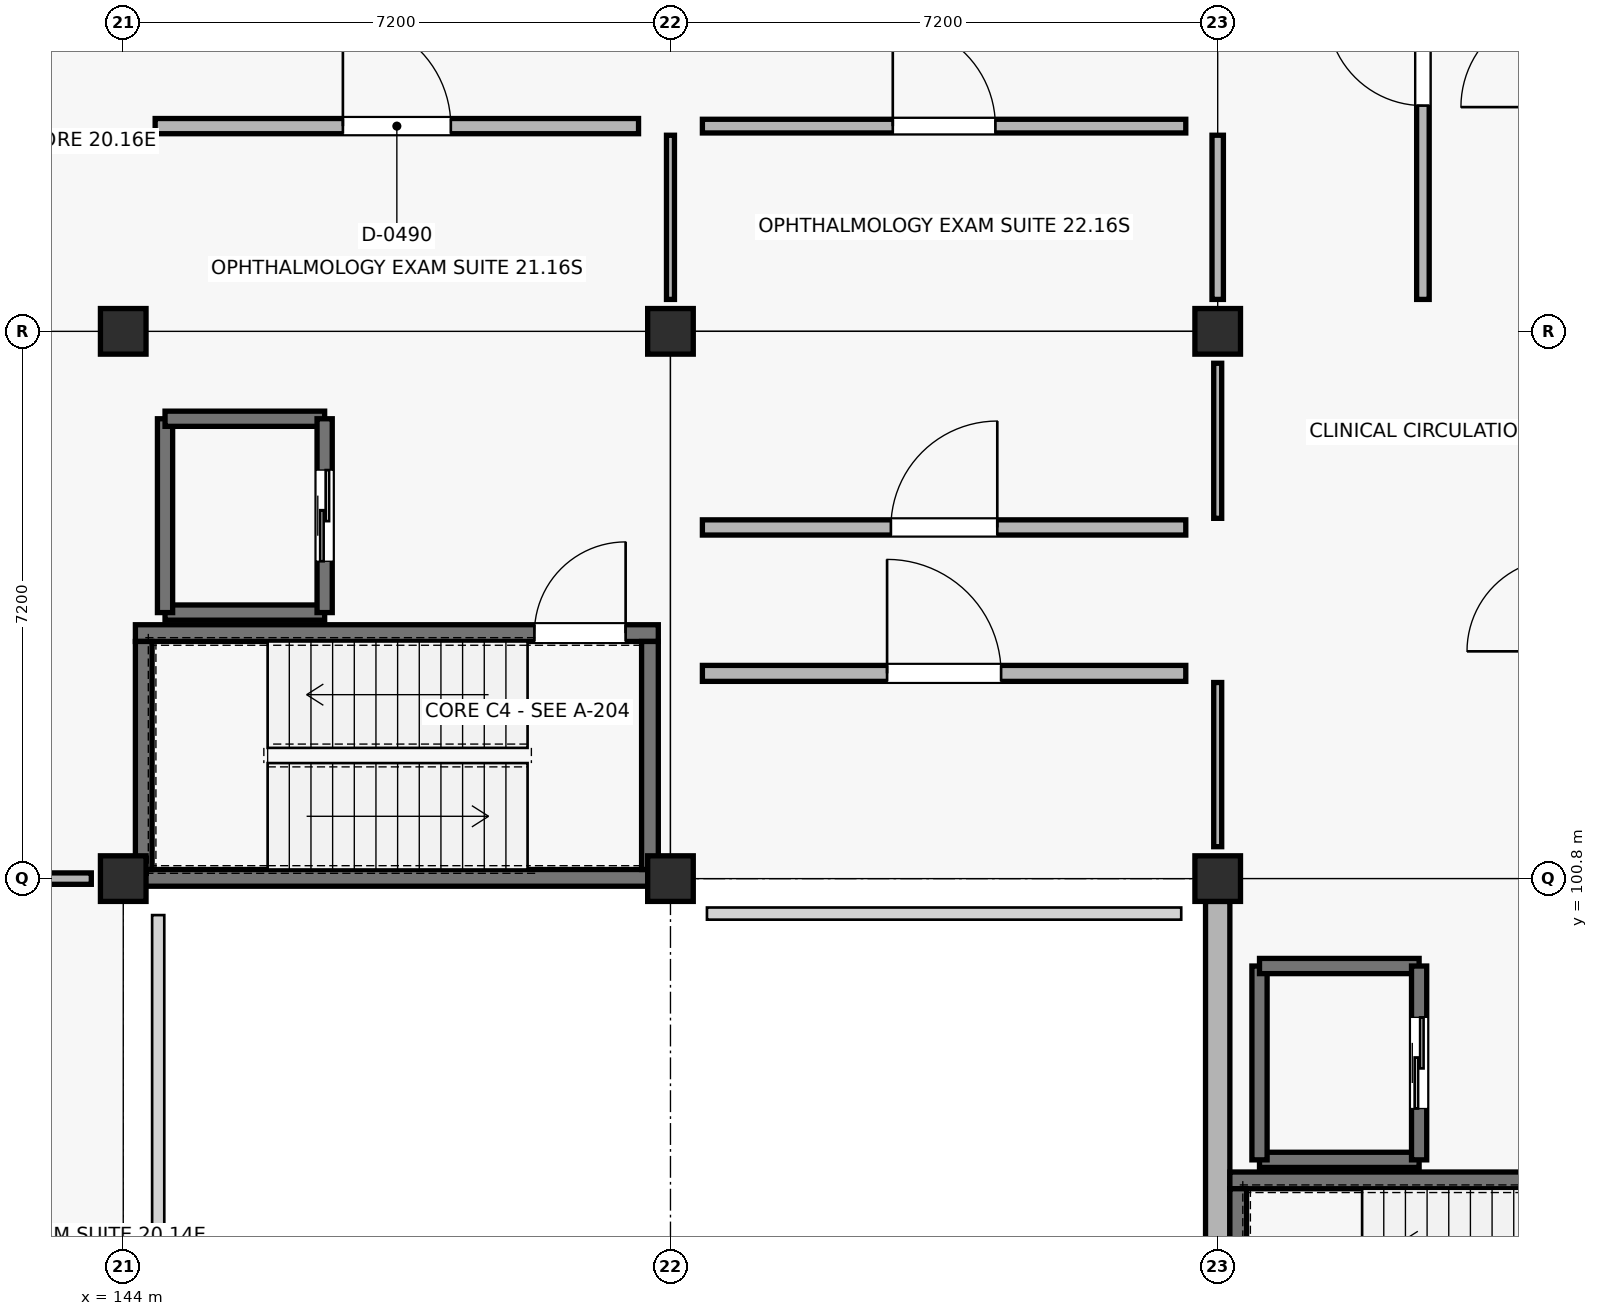
"""IFC4 building model, lengths in metres.
Left out: names, types, materials, properties, quantities, classifications, styles, units other than length and angle.
Written with IfcOpenShell. Run it as: python <this file> out.ifc"""

import sys

from ifc_helpers import new_model, si_unit, direction, frame, frame_2d, origin, origin_2d, place, context, subcontext, project, spatial, rectangle, extrude, element, fill, save


model = new_model("IFC4")
c1 = context("Model", 3, precision=1e-05, world=origin(), true_north=direction((0.0, 1.0)))
c2 = subcontext(c1, "Body", "Model", "MODEL_VIEW")
j1 = project(units=[si_unit("LENGTHUNIT", "METRE"), si_unit("PLANEANGLEUNIT", "RADIAN")], contexts=[c1])
p1 = place(None, origin())
s1 = spatial("IfcSite", under=j1, at=p1, CompositionType="ELEMENT")
p2 = place(p1, origin())
s2 = spatial("IfcBuilding", under=s1, at=p2, CompositionType="ELEMENT")
p3 = place(p2, frame((0.0, 0.0, 9.0)))
s3 = spatial("IfcBuildingStorey", under=s2, at=p3, CompositionType="ELEMENT", Elevation=9.0)
for number, where, z_axis, x_axis in (
    (1, (144.0, 100.8, 0.0), (0.0, 0.0, 1.0), (1.0, 0.0, 0.0)),
    (2, (144.0, 108.0, 0.0), (0.0, 0.0, 1.0), (1.0, 0.0, 0.0)),
    (3, (151.2, 100.8, 0.0), (0.0, 0.0, 1.0), (1.0, 0.0, 0.0)),
    (4, (151.2, 108.0, 0.0), (0.0, 0.0, 1.0), (1.0, 0.0, 0.0)),
    (5, (158.4, 100.8, 0.0), (0.0, 0.0, 1.0), (1.0, 0.0, 0.0)),
    (6, (158.4, 108.0, 0.0), (0.0, 0.0, 1.0), (1.0, 0.0, 0.0)),
):
    element("IfcColumn", number, at=place(p3, frame(where, z_axis=z_axis, x_axis=x_axis)), inside=s3, PredefinedType="COLUMN", context=c2, shape_type="SweptSolid", body=[
        extrude(rectangle(XDim=0.6, YDim=0.6, at=origin_2d()), origin(), (0.0, 0.0, 1.0), 4.5),
    ])
p4 = place(p3, frame((158.4, 100.5, 0.0), z_axis=(0.0, 0.0, 1.0), x_axis=(0.0, -1.0, 0.0)))
e7 = element("IfcWall", 7, at=p4, inside=s3, PredefinedType="STANDARD", context=c2, shape_type="SweptSolid", body=[
    extrude(rectangle(XDim=6.6, YDim=0.32, at=frame_2d((3.3, 0.0))), origin(), (0.0, 0.0, 1.0), 3.69),
])
p5 = place(p3, frame((158.56, 96.83, 0.0), z_axis=(0.0, 0.0, 1.0), x_axis=(1.0, 0.0, 0.0)))
e8 = element("IfcWall", 8, at=p5, inside=s3, PredefinedType="SHEAR", context=c2, shape_type="SweptSolid", body=[
    extrude(rectangle(XDim=6.88, YDim=0.22, at=frame_2d((3.44, 0.0))), origin(), (0.0, 0.0, 1.0), 4.24),
])
p6 = place(p5, frame((5.25, 0.0, 0.0)))
e9 = element("IfcOpeningElement", 9, at=p6, cuts=e8, PredefinedType="OPENING", context=c2, shape_type="SweptSolid", body=[
    extrude(rectangle(XDim=1.2, YDim=2.15, at=frame_2d((0.6, 1.075))), frame((0.0, 0.12, 0.0), z_axis=(0.0, -1.0, 0.0), x_axis=(1.0, 0.0, 0.0)), (0.0, 0.0, 1.0), 0.24),
])
p7 = place(p3, frame((158.67, 93.72, 0.0), z_axis=(0.0, 0.0, 1.0), x_axis=(0.0, 1.0, 0.0)))
e10 = element("IfcWall", 10, at=p7, inside=s3, PredefinedType="SHEAR", context=c2, shape_type="SweptSolid", body=[
    extrude(rectangle(XDim=3.0, YDim=0.22, at=frame_2d((1.5, 0.0))), origin(), (0.0, 0.0, 1.0), 4.24),
])
p8 = place(p3, frame((158.95, 97.1, 0.0), z_axis=(0.0, 0.0, 1.0), x_axis=(1.0, 0.0, 0.0)))
e11 = element("IfcWall", 11, at=p8, inside=s3, PredefinedType="SHEAR", context=c2, shape_type="SweptSolid", body=[
    extrude(rectangle(XDim=2.1, YDim=0.2, at=frame_2d((1.05, 0.0))), origin(), (0.0, 0.0, 1.0), 4.24),
])
p9 = place(p3, frame((158.95, 97.1, 0.0), z_axis=(0.0, 0.0, 1.0), x_axis=(0.0, 1.0, 0.0)))
e12 = element("IfcWall", 12, at=p9, inside=s3, PredefinedType="SHEAR", context=c2, shape_type="SweptSolid", body=[
    extrude(rectangle(XDim=2.55, YDim=0.2, at=frame_2d((1.275, 0.0))), origin(), (0.0, 0.0, 1.0), 4.24),
])
p10 = place(p3, frame((158.95, 99.65, 0.0), z_axis=(0.0, 0.0, 1.0), x_axis=(1.0, 0.0, 0.0)))
e13 = element("IfcWall", 13, at=p10, inside=s3, PredefinedType="SHEAR", context=c2, shape_type="SweptSolid", body=[
    extrude(rectangle(XDim=2.1, YDim=0.2, at=frame_2d((1.05, 0.0))), origin(), (0.0, 0.0, 1.0), 4.24),
])
p11 = place(p3, frame((161.05, 97.1, 0.0), z_axis=(0.0, 0.0, 1.0), x_axis=(0.0, 1.0, 0.0)))
e14 = element("IfcWall", 14, at=p11, inside=s3, PredefinedType="SHEAR", context=c2, shape_type="SweptSolid", body=[
    extrude(rectangle(XDim=2.55, YDim=0.2, at=frame_2d((1.275, 0.0))), origin(), (0.0, 0.0, 1.0), 4.24),
])
p12 = place(p11, frame((0.675, 0.0, 0.0)))
e15 = element("IfcOpeningElement", 15, at=p12, cuts=e14, PredefinedType="OPENING", context=c2, shape_type="SweptSolid", body=[
    extrude(rectangle(XDim=1.2, YDim=2.15, at=frame_2d((0.6, 1.075))), frame((0.0, 0.11, 0.0), z_axis=(0.0, -1.0, 0.0), x_axis=(1.0, 0.0, 0.0)), (0.0, 0.0, 1.0), 0.22),
])
p13 = place(p3, frame((144.16, 100.81, 0.0), z_axis=(0.0, 0.0, 1.0), x_axis=(1.0, 0.0, 0.0)))
e16 = element("IfcWall", 16, at=p13, inside=s3, PredefinedType="SHEAR", context=c2, shape_type="SweptSolid", body=[
    extrude(rectangle(XDim=6.88, YDim=0.22, at=frame_2d((3.44, 0.0))), origin(), (0.0, 0.0, 1.0), 4.24),
])
p14 = place(p3, frame((144.16, 104.03, 0.0), z_axis=(0.0, 0.0, 1.0), x_axis=(1.0, 0.0, 0.0)))
e17 = element("IfcWall", 17, at=p14, inside=s3, PredefinedType="SHEAR", context=c2, shape_type="SweptSolid", body=[
    extrude(rectangle(XDim=6.88, YDim=0.22, at=frame_2d((3.44, 0.0))), origin(), (0.0, 0.0, 1.0), 4.24),
])
p15 = place(p14, frame((5.25, 0.0, 0.0)))
e18 = element("IfcOpeningElement", 18, at=p15, cuts=e17, PredefinedType="OPENING", context=c2, shape_type="SweptSolid", body=[
    extrude(rectangle(XDim=1.2, YDim=2.15, at=frame_2d((0.6, 1.075))), frame((0.0, 0.12, 0.0), z_axis=(0.0, -1.0, 0.0), x_axis=(1.0, 0.0, 0.0)), (0.0, 0.0, 1.0), 0.24),
])
for number, where, z_axis, x_axis in (
    (19, (144.27, 100.92, 0.0), (0.0, 0.0, 1.0), (0.0, 1.0, 0.0)),
    (20, (150.93, 100.92, 0.0), (0.0, 0.0, 1.0), (0.0, 1.0, 0.0)),
):
    element("IfcWall", number, at=place(p3, frame(where, z_axis=z_axis, x_axis=x_axis)), inside=s3, PredefinedType="SHEAR", context=c2, shape_type="SweptSolid", body=[
        extrude(rectangle(XDim=3.0, YDim=0.22, at=frame_2d((1.5, 0.0))), origin(), (0.0, 0.0, 1.0), 4.24),
    ])
p16 = place(p3, frame((144.55, 104.3, 0.0), z_axis=(0.0, 0.0, 1.0), x_axis=(1.0, 0.0, 0.0)))
e21 = element("IfcWall", 21, at=p16, inside=s3, PredefinedType="SHEAR", context=c2, shape_type="SweptSolid", body=[
    extrude(rectangle(XDim=2.1, YDim=0.2, at=frame_2d((1.05, 0.0))), origin(), (0.0, 0.0, 1.0), 4.24),
])
p17 = place(p3, frame((144.55, 104.3, 0.0), z_axis=(0.0, 0.0, 1.0), x_axis=(0.0, 1.0, 0.0)))
e22 = element("IfcWall", 22, at=p17, inside=s3, PredefinedType="SHEAR", context=c2, shape_type="SweptSolid", body=[
    extrude(rectangle(XDim=2.55, YDim=0.2, at=frame_2d((1.275, 0.0))), origin(), (0.0, 0.0, 1.0), 4.24),
])
p18 = place(p3, frame((144.55, 106.85, 0.0), z_axis=(0.0, 0.0, 1.0), x_axis=(1.0, 0.0, 0.0)))
e23 = element("IfcWall", 23, at=p18, inside=s3, PredefinedType="SHEAR", context=c2, shape_type="SweptSolid", body=[
    extrude(rectangle(XDim=2.1, YDim=0.2, at=frame_2d((1.05, 0.0))), origin(), (0.0, 0.0, 1.0), 4.24),
])
p19 = place(p3, frame((146.65, 104.3, 0.0), z_axis=(0.0, 0.0, 1.0), x_axis=(0.0, 1.0, 0.0)))
e24 = element("IfcWall", 24, at=p19, inside=s3, PredefinedType="SHEAR", context=c2, shape_type="SweptSolid", body=[
    extrude(rectangle(XDim=2.55, YDim=0.2, at=frame_2d((1.275, 0.0))), origin(), (0.0, 0.0, 1.0), 4.24),
])
p20 = place(p19, frame((0.675, 0.0, 0.0)))
e25 = element("IfcOpeningElement", 25, at=p20, cuts=e24, PredefinedType="OPENING", context=c2, shape_type="SweptSolid", body=[
    extrude(rectangle(XDim=1.2, YDim=2.15, at=frame_2d((0.6, 1.075))), frame((0.0, 0.11, 0.0), z_axis=(0.0, -1.0, 0.0), x_axis=(1.0, 0.0, 0.0)), (0.0, 0.0, 1.0), 0.22),
])
p21 = place(p3, frame((141.42, 100.8, 0.0), z_axis=(0.0, 0.0, 1.0), x_axis=(1.0, 0.0, 0.0)))
e26 = element("IfcWall", 26, at=p21, inside=s3, PredefinedType="PARTITIONING", context=c2, shape_type="SweptSolid", body=[
    extrude(rectangle(XDim=2.16, YDim=0.15, at=frame_2d((1.08, 0.0))), origin(), (0.0, 0.0, 1.0), 3.38),
])
p22 = place(p3, frame((144.42, 110.7, 0.0), z_axis=(0.0, 0.0, 1.0), x_axis=(1.0, 0.0, 0.0)))
e27 = element("IfcWall", 27, at=p22, inside=s3, PredefinedType="SOLIDWALL", context=c2, shape_type="SweptSolid", body=[
    extrude(rectangle(XDim=6.36, YDim=0.2, at=frame_2d((3.18, 0.0))), origin(), (0.0, 0.0, 1.0), 3.38),
])
p23 = place(p22, frame((2.47, 0.0, 0.0)))
e28 = element("IfcOpeningElement", 28, at=p23, cuts=e27, PredefinedType="OPENING", context=c2, shape_type="SweptSolid", body=[
    extrude(rectangle(XDim=1.42, YDim=2.19, at=frame_2d((0.71, 1.095))), frame((0.0, 0.11, 0.0), z_axis=(0.0, -1.0, 0.0), x_axis=(1.0, 0.0, 0.0)), (0.0, 0.0, 1.0), 0.22),
])
p24 = place(p3, frame((151.2, 108.42, 0.0), z_axis=(0.0, 0.0, 1.0), x_axis=(0.0, 1.0, 0.0)))
e29 = element("IfcWall", 29, at=p24, inside=s3, PredefinedType="PARTITIONING", context=c2, shape_type="SweptSolid", body=[
    extrude(rectangle(XDim=2.16, YDim=0.105, at=frame_2d((1.08, 0.0))), origin(), (0.0, 0.0, 1.0), 3.38),
])
p25 = place(p3, frame((151.62, 103.5, 0.0), z_axis=(0.0, 0.0, 1.0), x_axis=(1.0, 0.0, 0.0)))
e30 = element("IfcWall", 30, at=p25, inside=s3, PredefinedType="PLUMBINGWALL", context=c2, shape_type="SweptSolid", body=[
    extrude(rectangle(XDim=6.36, YDim=0.21, at=frame_2d((3.18, 0.0))), origin(), (0.0, 0.0, 1.0), 3.38),
])
p26 = place(p25, frame((2.43, 0.0, 0.0)))
e31 = element("IfcOpeningElement", 31, at=p26, cuts=e30, PredefinedType="OPENING", context=c2, shape_type="SweptSolid", body=[
    extrude(rectangle(XDim=1.5, YDim=2.2, at=frame_2d((0.75, 1.1))), frame((0.0, 0.115, 0.0), z_axis=(0.0, -1.0, 0.0), x_axis=(1.0, 0.0, 0.0)), (0.0, 0.0, 1.0), 0.23),
])
p27 = place(p3, frame((158.4, 101.22, 0.0), z_axis=(0.0, 0.0, 1.0), x_axis=(0.0, 1.0, 0.0)))
e32 = element("IfcWall", 32, at=p27, inside=s3, PredefinedType="PARTITIONING", context=c2, shape_type="SweptSolid", body=[
    extrude(rectangle(XDim=2.16, YDim=0.105, at=frame_2d((1.08, 0.0))), origin(), (0.0, 0.0, 1.0), 3.38),
])
p28 = place(p3, frame((151.62, 105.42, 0.0), z_axis=(0.0, 0.0, 1.0), x_axis=(1.0, 0.0, 0.0)))
e33 = element("IfcWall", 33, at=p28, inside=s3, PredefinedType="SOLIDWALL", context=c2, shape_type="SweptSolid", body=[
    extrude(rectangle(XDim=6.36, YDim=0.2, at=frame_2d((3.18, 0.0))), origin(), (0.0, 0.0, 1.0), 3.38),
])
p29 = place(p28, frame((2.48, 0.0, 0.0)))
e34 = element("IfcOpeningElement", 34, at=p29, cuts=e33, PredefinedType="OPENING", context=c2, shape_type="SweptSolid", body=[
    extrude(rectangle(XDim=1.4, YDim=2.2, at=frame_2d((0.7, 1.1))), frame((0.0, 0.11, 0.0), z_axis=(0.0, -1.0, 0.0), x_axis=(1.0, 0.0, 0.0)), (0.0, 0.0, 1.0), 0.22),
])
p30 = place(p3, frame((158.4, 105.54, 0.0), z_axis=(0.0, 0.0, 1.0), x_axis=(0.0, 1.0, 0.0)))
e35 = element("IfcWall", 35, at=p30, inside=s3, PredefinedType="PARTITIONING", context=c2, shape_type="SweptSolid", body=[
    extrude(rectangle(XDim=2.04, YDim=0.105, at=frame_2d((1.02, 0.0))), origin(), (0.0, 0.0, 1.0), 3.38),
])
p31 = place(p3, frame((151.62, 110.7, 0.0), z_axis=(0.0, 0.0, 1.0), x_axis=(1.0, 0.0, 0.0)))
e36 = element("IfcWall", 36, at=p31, inside=s3, PredefinedType="PARTITIONING", context=c2, shape_type="SweptSolid", body=[
    extrude(rectangle(XDim=6.36, YDim=0.18, at=frame_2d((3.18, 0.0))), origin(), (0.0, 0.0, 1.0), 3.38),
])
p32 = place(p31, frame((2.505, 0.0, 0.0)))
e37 = element("IfcOpeningElement", 37, at=p32, cuts=e36, PredefinedType="OPENING", context=c2, shape_type="SweptSolid", body=[
    extrude(rectangle(XDim=1.35, YDim=2.2, at=frame_2d((0.675, 1.1))), frame((0.0, 0.1, 0.0), z_axis=(0.0, -1.0, 0.0), x_axis=(1.0, 0.0, 0.0)), (0.0, 0.0, 1.0), 0.2),
])
p33 = place(p3, frame((158.4, 108.42, 0.0), z_axis=(0.0, 0.0, 1.0), x_axis=(0.0, 1.0, 0.0)))
e38 = element("IfcWall", 38, at=p33, inside=s3, PredefinedType="PARTITIONING", context=c2, shape_type="SweptSolid", body=[
    extrude(rectangle(XDim=2.16, YDim=0.15, at=frame_2d((1.08, 0.0))), origin(), (0.0, 0.0, 1.0), 3.38),
])
p34 = place(p3, frame((161.1, 108.42, 0.0), z_axis=(0.0, 0.0, 1.0), x_axis=(0.0, 1.0, 0.0)))
e39 = element("IfcWall", 39, at=p34, inside=s3, PredefinedType="PARTITIONING", context=c2, shape_type="SweptSolid", body=[
    extrude(rectangle(XDim=6.36, YDim=0.165, at=frame_2d((3.18, 0.0))), origin(), (0.0, 0.0, 1.0), 3.38),
])
p35 = place(p34, frame((2.55, 0.0, 0.0)))
e40 = element("IfcOpeningElement", 40, at=p35, cuts=e39, PredefinedType="OPENING", context=c2, shape_type="SweptSolid", body=[
    extrude(rectangle(XDim=1.26, YDim=2.04, at=frame_2d((0.63, 1.02))), frame((0.0, 0.093, 0.0), z_axis=(0.0, -1.0, 0.0), x_axis=(1.0, 0.0, 0.0)), (0.0, 0.0, 1.0), 0.185),
])
p36 = place(p12, origin())
e41 = element("IfcDoor", 41, at=p36, inside=s3, OperationType="SLIDING_TO_LEFT", PredefinedType="DOOR", context=c2, shape_type="SweptSolid", body=[
    extrude(rectangle(XDim=1.2, YDim=2.15, at=frame_2d((0.6, 1.075))), frame((0.0, 0.025, 0.0), z_axis=(0.0, -1.0, 0.0), x_axis=(1.0, 0.0, 0.0)), (0.0, 0.0, 1.0), 0.05),
])
fill(e15, e41)
p37 = place(p15, origin())
e42 = element("IfcDoor", 42, at=p37, inside=s3, OperationType="SINGLE_SWING_RIGHT", PredefinedType="DOOR", context=c2, shape_type="SweptSolid", body=[
    extrude(rectangle(XDim=1.2, YDim=2.15, at=frame_2d((0.6, 1.075))), frame((0.0, 0.025, 0.0), z_axis=(0.0, -1.0, 0.0), x_axis=(1.0, 0.0, 0.0)), (0.0, 0.0, 1.0), 0.05),
])
fill(e18, e42)
p38 = place(p20, origin())
e43 = element("IfcDoor", 43, at=p38, inside=s3, OperationType="SLIDING_TO_LEFT", PredefinedType="DOOR", context=c2, shape_type="SweptSolid", body=[
    extrude(rectangle(XDim=1.2, YDim=2.15, at=frame_2d((0.6, 1.075))), frame((0.0, 0.025, 0.0), z_axis=(0.0, -1.0, 0.0), x_axis=(1.0, 0.0, 0.0)), (0.0, 0.0, 1.0), 0.05),
])
fill(e25, e43)
p39 = place(p23, origin())
e44 = element("IfcDoor", 44, at=p39, inside=s3, OperationType="SINGLE_SWING_LEFT", PredefinedType="DOOR", context=c2, shape_type="SweptSolid", body=[
    extrude(rectangle(XDim=1.42, YDim=2.19, at=frame_2d((0.71, 1.095))), frame((0.0, 0.025, 0.0), z_axis=(0.0, -1.0, 0.0), x_axis=(1.0, 0.0, 0.0)), (0.0, 0.0, 1.0), 0.05),
])
fill(e28, e44)
p40 = place(p26, origin())
e45 = element("IfcDoor", 45, at=p40, inside=s3, OperationType="SINGLE_SWING_LEFT", PredefinedType="DOOR", context=c2, shape_type="SweptSolid", body=[
    extrude(rectangle(XDim=1.5, YDim=2.2, at=frame_2d((0.75, 1.1))), frame((0.0, 0.025, 0.0), z_axis=(0.0, -1.0, 0.0), x_axis=(1.0, 0.0, 0.0)), (0.0, 0.0, 1.0), 0.05),
])
fill(e31, e45)
p41 = place(p29, origin())
e46 = element("IfcDoor", 46, at=p41, inside=s3, OperationType="SINGLE_SWING_RIGHT", PredefinedType="DOOR", context=c2, shape_type="SweptSolid", body=[
    extrude(rectangle(XDim=1.4, YDim=2.2, at=frame_2d((0.7, 1.1))), frame((0.0, 0.025, 0.0), z_axis=(0.0, -1.0, 0.0), x_axis=(1.0, 0.0, 0.0)), (0.0, 0.0, 1.0), 0.05),
])
fill(e34, e46)
p42 = place(p32, origin())
e47 = element("IfcDoor", 47, at=p42, inside=s3, OperationType="SINGLE_SWING_LEFT", PredefinedType="DOOR", context=c2, shape_type="SweptSolid", body=[
    extrude(rectangle(XDim=1.35, YDim=2.2, at=frame_2d((0.675, 1.1))), frame((0.0, 0.025, 0.0), z_axis=(0.0, -1.0, 0.0), x_axis=(1.0, 0.0, 0.0)), (0.0, 0.0, 1.0), 0.05),
])
fill(e37, e47)
p43 = place(p35, origin())
e48 = element("IfcDoor", 48, at=p43, inside=s3, OperationType="SINGLE_SWING_RIGHT", PredefinedType="DOOR", context=c2, shape_type="SweptSolid", body=[
    extrude(rectangle(XDim=1.26, YDim=2.04, at=frame_2d((0.63, 1.02))), frame((0.0, 0.025, 0.0), z_axis=(0.0, -1.0, 0.0), x_axis=(1.0, 0.0, 0.0)), (0.0, 0.0, 1.0), 0.05),
])
fill(e40, e48)
save(model, sys.argv[1])
